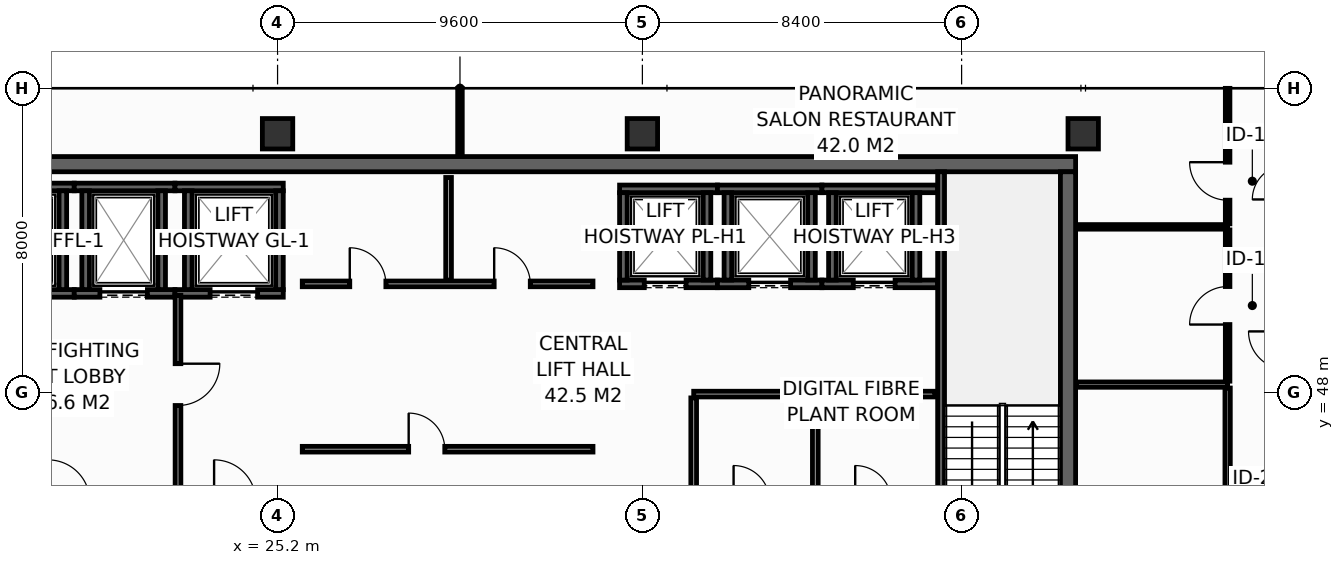
"""IFC4 building model, lengths in metres.
Left out: names, types, materials, properties, quantities, classifications, styles, units other than length and angle.
Written with IfcOpenShell. Run it as: python <this file> out.ifc"""

import sys

from ifc_helpers import new_model, si_unit, direction, frame, frame_2d, origin, origin_2d, place, context, subcontext, project, spatial, rectangle, hollow_rectangle, extrude, element, fill, save


model = new_model("IFC4")
c1 = context("Model", 3, precision=1e-05, world=origin(), true_north=direction((0.0, 1.0)))
c2 = subcontext(c1, "Body", "Model", "MODEL_VIEW")
j1 = project(units=[si_unit("LENGTHUNIT", "METRE"), si_unit("PLANEANGLEUNIT", "RADIAN")], contexts=[c1])
p1 = place(None, origin())
s1 = spatial("IfcSite", under=j1, at=p1, CompositionType="ELEMENT")
p2 = place(p1, origin())
s2 = spatial("IfcBuilding", under=s1, at=p2, CompositionType="ELEMENT")
p3 = place(p2, frame((0.0, 0.0, 257.2)))
s3 = spatial("IfcBuildingStorey", under=s2, at=p3, CompositionType="ELEMENT", Elevation=257.2)
p4 = place(p3, frame((13.7, 54.0, 0.0), z_axis=(0.0, 0.0, 1.0), x_axis=(1.0, 0.0, 0.0)))
e1 = element("IfcWall", 1, at=p4, inside=s3, PredefinedType="SHEAR", context=c2, shape_type="SweptSolid", body=[
    extrude(rectangle(XDim=32.5, YDim=0.4, at=frame_2d((16.25, 0.0))), origin(), (0.0, 0.0, 1.0), 3.55),
])
p5 = place(p3, frame((46.0, 43.4, 0.0), z_axis=(0.0, 0.0, 1.0), x_axis=(0.0, 1.0, 0.0)))
e2 = element("IfcWall", 2, at=p5, inside=s3, PredefinedType="SHEAR", context=c2, shape_type="SweptSolid", body=[
    extrude(rectangle(XDim=10.4, YDim=0.4, at=frame_2d((5.2, 0.0))), origin(), (0.0, 0.0, 1.0), 3.55),
])
for number, where, z_axis, x_axis in (
    (3, (25.2, 54.8, 0.0), (0.0, 0.0, 1.0), (1.0, 0.0, 0.0)),
    (4, (34.8, 54.8, 0.0), (0.0, 0.0, 1.0), (1.0, 0.0, 0.0)),
    (5, (46.4, 54.8, 0.0), (0.0, 0.0, 1.0), (1.0, 0.0, 0.0)),
):
    element("IfcColumn", number, at=place(p3, frame(where, z_axis=z_axis, x_axis=x_axis)), inside=s3, PredefinedType="COLUMN", context=c2, shape_type="SweptSolid", body=[
        extrude(hollow_rectangle(XDim=0.8, YDim=0.8, WallThickness=0.036, at=origin_2d()), origin(), (0.0, 0.0, 1.0), 3.8),
    ])
p6 = place(p3, frame((17.33, 50.6, 0.0), z_axis=(0.0, 0.0, 1.0), x_axis=(1.0, 0.0, 0.0)))
e6 = element("IfcWall", 6, at=p6, inside=s3, PredefinedType="SHEAR", context=c2, shape_type="SweptSolid", body=[
    extrude(rectangle(XDim=2.52, YDim=0.2, at=frame_2d((1.26, 0.0))), origin(), (0.0, 0.0, 1.0), 3.55),
])
p7 = place(p6, frame((0.595, 0.0, 0.0)))
e7 = element("IfcOpeningElement", 7, at=p7, cuts=e6, PredefinedType="OPENING", context=c2, shape_type="SweptSolid", body=[
    extrude(rectangle(XDim=1.25, YDim=2.3, at=frame_2d((0.625, 1.15))), frame((0.0, 0.11, 0.0), z_axis=(0.0, -1.0, 0.0), x_axis=(1.0, 0.0, 0.0)), (0.0, 0.0, 1.0), 0.22),
])
p8 = place(p3, frame((17.33, 53.4, 0.0), z_axis=(0.0, 0.0, 1.0), x_axis=(1.0, 0.0, 0.0)))
e8 = element("IfcWall", 8, at=p8, inside=s3, PredefinedType="SHEAR", context=c2, shape_type="SweptSolid", body=[
    extrude(rectangle(XDim=2.52, YDim=0.2, at=frame_2d((1.26, 0.0))), origin(), (0.0, 0.0, 1.0), 3.55),
])
p9 = place(p3, frame((19.55, 50.7, 0.0), z_axis=(0.0, 0.0, 1.0), x_axis=(0.0, 1.0, 0.0)))
e9 = element("IfcWall", 9, at=p9, inside=s3, PredefinedType="SHEAR", context=c2, shape_type="SweptSolid", body=[
    extrude(rectangle(XDim=2.6, YDim=0.2, at=frame_2d((1.3, 0.0))), origin(), (0.0, 0.0, 1.0), 3.55),
])
p10 = place(p3, frame((19.85, 50.6, 0.0), z_axis=(0.0, 0.0, 1.0), x_axis=(1.0, 0.0, 0.0)))
e10 = element("IfcWall", 10, at=p10, inside=s3, PredefinedType="SHEAR", context=c2, shape_type="SweptSolid", body=[
    extrude(rectangle(XDim=2.65, YDim=0.2, at=frame_2d((1.325, 0.0))), origin(), (0.0, 0.0, 1.0), 3.55),
])
p11 = place(p10, frame((0.675, 0.0, 0.0)))
e11 = element("IfcOpeningElement", 11, at=p11, cuts=e10, PredefinedType="OPENING", context=c2, shape_type="SweptSolid", body=[
    extrude(rectangle(XDim=1.25, YDim=2.3, at=frame_2d((0.625, 1.15))), frame((0.0, 0.11, 0.0), z_axis=(0.0, -1.0, 0.0), x_axis=(1.0, 0.0, 0.0)), (0.0, 0.0, 1.0), 0.22),
])
p12 = place(p3, frame((19.85, 53.4, 0.0), z_axis=(0.0, 0.0, 1.0), x_axis=(1.0, 0.0, 0.0)))
e12 = element("IfcWall", 12, at=p12, inside=s3, PredefinedType="SHEAR", context=c2, shape_type="SweptSolid", body=[
    extrude(rectangle(XDim=2.65, YDim=0.2, at=frame_2d((1.325, 0.0))), origin(), (0.0, 0.0, 1.0), 3.55),
])
for number, where, z_axis, x_axis in (
    (13, (20.15, 50.7, 0.0), (0.0, 0.0, 1.0), (0.0, 1.0, 0.0)),
    (14, (22.15, 50.7, 0.0), (0.0, 0.0, 1.0), (0.0, 1.0, 0.0)),
):
    element("IfcWall", number, at=place(p3, frame(where, z_axis=z_axis, x_axis=x_axis)), inside=s3, PredefinedType="SHEAR", context=c2, shape_type="SweptSolid", body=[
        extrude(rectangle(XDim=2.6, YDim=0.2, at=frame_2d((1.3, 0.0))), origin(), (0.0, 0.0, 1.0), 3.55),
    ])
p13 = place(p3, frame((22.5, 50.6, 0.0), z_axis=(0.0, 0.0, 1.0), x_axis=(1.0, 0.0, 0.0)))
e15 = element("IfcWall", 15, at=p13, inside=s3, PredefinedType="SHEAR", context=c2, shape_type="SweptSolid", body=[
    extrude(rectangle(XDim=2.85, YDim=0.2, at=frame_2d((1.425, 0.0))), origin(), (0.0, 0.0, 1.0), 3.55),
])
p14 = place(p13, frame((0.925, 0.0, 0.0)))
e16 = element("IfcOpeningElement", 16, at=p14, cuts=e15, PredefinedType="OPENING", context=c2, shape_type="SweptSolid", body=[
    extrude(rectangle(XDim=1.25, YDim=2.3, at=frame_2d((0.625, 1.15))), frame((0.0, 0.11, 0.0), z_axis=(0.0, -1.0, 0.0), x_axis=(1.0, 0.0, 0.0)), (0.0, 0.0, 1.0), 0.22),
])
p15 = place(p3, frame((22.5, 53.4, 0.0), z_axis=(0.0, 0.0, 1.0), x_axis=(1.0, 0.0, 0.0)))
e17 = element("IfcWall", 17, at=p15, inside=s3, PredefinedType="SHEAR", context=c2, shape_type="SweptSolid", body=[
    extrude(rectangle(XDim=2.85, YDim=0.2, at=frame_2d((1.425, 0.0))), origin(), (0.0, 0.0, 1.0), 3.55),
])
for number, where, z_axis, x_axis in (
    (18, (22.85, 50.7, 0.0), (0.0, 0.0, 1.0), (0.0, 1.0, 0.0)),
    (19, (25.25, 50.7, 0.0), (0.0, 0.0, 1.0), (0.0, 1.0, 0.0)),
):
    element("IfcWall", number, at=place(p3, frame(where, z_axis=z_axis, x_axis=x_axis)), inside=s3, PredefinedType="SHEAR", context=c2, shape_type="SweptSolid", body=[
        extrude(rectangle(XDim=2.6, YDim=0.2, at=frame_2d((1.3, 0.0))), origin(), (0.0, 0.0, 1.0), 3.55),
    ])
p16 = place(p3, frame((34.2, 50.85, 0.0), z_axis=(0.0, 0.0, 1.0), x_axis=(1.0, 0.0, 0.0)))
e20 = element("IfcWall", 20, at=p16, inside=s3, PredefinedType="SHEAR", context=c2, shape_type="SweptSolid", body=[
    extrude(rectangle(XDim=2.575, YDim=0.2, at=frame_2d((1.288, 0.0))), origin(), (0.0, 0.0, 1.0), 3.55),
])
p17 = place(p16, frame((0.65, 0.0, 0.0)))
e21 = element("IfcOpeningElement", 21, at=p17, cuts=e20, PredefinedType="OPENING", context=c2, shape_type="SweptSolid", body=[
    extrude(rectangle(XDim=1.1, YDim=2.2, at=frame_2d((0.55, 1.1))), frame((0.0, 0.11, 0.0), z_axis=(0.0, -1.0, 0.0), x_axis=(1.0, 0.0, 0.0)), (0.0, 0.0, 1.0), 0.22),
])
p18 = place(p3, frame((34.2, 53.35, 0.0), z_axis=(0.0, 0.0, 1.0), x_axis=(1.0, 0.0, 0.0)))
e22 = element("IfcWall", 22, at=p18, inside=s3, PredefinedType="SHEAR", context=c2, shape_type="SweptSolid", body=[
    extrude(rectangle(XDim=2.575, YDim=0.2, at=frame_2d((1.288, 0.0))), origin(), (0.0, 0.0, 1.0), 3.55),
])
for number, where, z_axis, x_axis in (
    (23, (34.3, 50.95, 0.0), (0.0, 0.0, 1.0), (0.0, 1.0, 0.0)),
    (24, (36.5, 50.95, 0.0), (0.0, 0.0, 1.0), (0.0, 1.0, 0.0)),
):
    element("IfcWall", number, at=place(p3, frame(where, z_axis=z_axis, x_axis=x_axis)), inside=s3, PredefinedType="SHEAR", context=c2, shape_type="SweptSolid", body=[
        extrude(rectangle(XDim=2.3, YDim=0.2, at=frame_2d((1.15, 0.0))), origin(), (0.0, 0.0, 1.0), 3.55),
    ])
p19 = place(p3, frame((36.775, 50.85, 0.0), z_axis=(0.0, 0.0, 1.0), x_axis=(1.0, 0.0, 0.0)))
e25 = element("IfcWall", 25, at=p19, inside=s3, PredefinedType="SHEAR", context=c2, shape_type="SweptSolid", body=[
    extrude(rectangle(XDim=2.75, YDim=0.2, at=frame_2d((1.375, 0.0))), origin(), (0.0, 0.0, 1.0), 3.55),
])
p20 = place(p19, frame((0.825, 0.0, 0.0)))
e26 = element("IfcOpeningElement", 26, at=p20, cuts=e25, PredefinedType="OPENING", context=c2, shape_type="SweptSolid", body=[
    extrude(rectangle(XDim=1.1, YDim=2.2, at=frame_2d((0.55, 1.1))), frame((0.0, 0.11, 0.0), z_axis=(0.0, -1.0, 0.0), x_axis=(1.0, 0.0, 0.0)), (0.0, 0.0, 1.0), 0.22),
])
p21 = place(p3, frame((36.775, 53.35, 0.0), z_axis=(0.0, 0.0, 1.0), x_axis=(1.0, 0.0, 0.0)))
e27 = element("IfcWall", 27, at=p21, inside=s3, PredefinedType="SHEAR", context=c2, shape_type="SweptSolid", body=[
    extrude(rectangle(XDim=2.75, YDim=0.2, at=frame_2d((1.375, 0.0))), origin(), (0.0, 0.0, 1.0), 3.55),
])
for number, where, z_axis, x_axis in (
    (28, (37.05, 50.95, 0.0), (0.0, 0.0, 1.0), (0.0, 1.0, 0.0)),
    (29, (39.25, 50.95, 0.0), (0.0, 0.0, 1.0), (0.0, 1.0, 0.0)),
):
    element("IfcWall", number, at=place(p3, frame(where, z_axis=z_axis, x_axis=x_axis)), inside=s3, PredefinedType="SHEAR", context=c2, shape_type="SweptSolid", body=[
        extrude(rectangle(XDim=2.3, YDim=0.2, at=frame_2d((1.15, 0.0))), origin(), (0.0, 0.0, 1.0), 3.55),
    ])
p22 = place(p3, frame((39.525, 50.85, 0.0), z_axis=(0.0, 0.0, 1.0), x_axis=(1.0, 0.0, 0.0)))
e30 = element("IfcWall", 30, at=p22, inside=s3, PredefinedType="SHEAR", context=c2, shape_type="SweptSolid", body=[
    extrude(rectangle(XDim=3.045, YDim=0.2, at=frame_2d((1.522, 0.0))), origin(), (0.0, 0.0, 1.0), 3.55),
])
p23 = place(p22, frame((0.825, 0.0, 0.0)))
e31 = element("IfcOpeningElement", 31, at=p23, cuts=e30, PredefinedType="OPENING", context=c2, shape_type="SweptSolid", body=[
    extrude(rectangle(XDim=1.1, YDim=2.2, at=frame_2d((0.55, 1.1))), frame((0.0, 0.11, 0.0), z_axis=(0.0, -1.0, 0.0), x_axis=(1.0, 0.0, 0.0)), (0.0, 0.0, 1.0), 0.22),
])
p24 = place(p3, frame((39.525, 53.35, 0.0), z_axis=(0.0, 0.0, 1.0), x_axis=(1.0, 0.0, 0.0)))
e32 = element("IfcWall", 32, at=p24, inside=s3, PredefinedType="SHEAR", context=c2, shape_type="SweptSolid", body=[
    extrude(rectangle(XDim=3.045, YDim=0.2, at=frame_2d((1.522, 0.0))), origin(), (0.0, 0.0, 1.0), 3.55),
])
for number, where, z_axis, x_axis in (
    (33, (39.8, 50.95, 0.0), (0.0, 0.0, 1.0), (0.0, 1.0, 0.0)),
    (34, (42.0, 50.95, 0.0), (0.0, 0.0, 1.0), (0.0, 1.0, 0.0)),
):
    element("IfcWall", number, at=place(p3, frame(where, z_axis=z_axis, x_axis=x_axis)), inside=s3, PredefinedType="SHEAR", context=c2, shape_type="SweptSolid", body=[
        extrude(rectangle(XDim=2.3, YDim=0.2, at=frame_2d((1.15, 0.0))), origin(), (0.0, 0.0, 1.0), 3.55),
    ])
p25 = place(p3, frame((42.66, 53.8, 0.0), z_axis=(0.0, 0.0, 1.0), x_axis=(0.0, -1.0, 0.0)))
e35 = element("IfcWall", 35, at=p25, inside=s3, PredefinedType="SHEAR", context=c2, shape_type="SweptSolid", body=[
    extrude(rectangle(XDim=10.4, YDim=0.18, at=frame_2d((5.2, 0.0))), origin(), (0.0, 0.0, 1.0), 3.55),
])
p26 = place(p25, frame((8.99, 0.0, 0.0)))
e36 = element("IfcOpeningElement", 36, at=p26, cuts=e35, PredefinedType="OPENING", context=c2, shape_type="SweptSolid", body=[
    extrude(rectangle(XDim=1.1, YDim=2.15, at=frame_2d((0.55, 1.075))), frame((0.0, 0.1, 0.0), z_axis=(0.0, -1.0, 0.0), x_axis=(1.0, 0.0, 0.0)), (0.0, 0.0, 1.0), 0.2),
])
p27 = place(p3, frame((22.58, 50.55, 0.0), z_axis=(0.0, 0.0, 1.0), x_axis=(0.0, -1.0, 0.0)))
e37 = element("IfcWall", 37, at=p27, inside=s3, PredefinedType="PARTITIONING", context=c2, shape_type="SweptSolid", body=[
    extrude(rectangle(XDim=5.33, YDim=0.15, at=frame_2d((2.665, 0.0))), origin(), (0.0, 0.0, 1.0), 3.55),
])
p28 = place(p27, frame((1.8, 0.0, 0.0)))
e38 = element("IfcOpeningElement", 38, at=p28, cuts=e37, PredefinedType="OPENING", context=c2, shape_type="SweptSolid", body=[
    extrude(rectangle(XDim=1.1, YDim=2.15, at=frame_2d((0.55, 1.075))), frame((0.0, 0.085, 0.0), z_axis=(0.0, -1.0, 0.0), x_axis=(1.0, 0.0, 0.0)), (0.0, 0.0, 1.0), 0.17),
])
p29 = place(p3, frame((36.15, 47.95, 0.0), z_axis=(0.0, 0.0, 1.0), x_axis=(1.0, 0.0, 0.0)))
e39 = element("IfcWall", 39, at=p29, inside=s3, PredefinedType="PARTITIONING", context=c2, shape_type="SweptSolid", body=[
    extrude(rectangle(XDim=6.35, YDim=0.15, at=frame_2d((3.175, 0.0))), origin(), (0.0, 0.0, 1.0), 3.55),
])
for number, where, z_axis, x_axis in (
    (40, (36.15, 45.22, 0.0), (0.0, 0.0, 1.0), (0.0, 1.0, 0.0)),
    (41, (39.35, 45.22, 0.0), (0.0, 0.0, 1.0), (0.0, 1.0, 0.0)),
):
    element("IfcWall", number, at=place(p3, frame(where, z_axis=z_axis, x_axis=x_axis)), inside=s3, PredefinedType="PARTITIONING", context=c2, shape_type="SweptSolid", body=[
        extrude(rectangle(XDim=2.63, YDim=0.15, at=frame_2d((1.315, 0.0))), origin(), (0.0, 0.0, 1.0), 3.55),
    ])
p30 = place(p3, frame((25.85, 50.85, 0.0), z_axis=(0.0, 0.0, 1.0), x_axis=(1.0, 0.0, 0.0)))
e42 = element("IfcWall", 42, at=p30, inside=s3, PredefinedType="PARTITIONING", context=c2, shape_type="SweptSolid", body=[
    extrude(rectangle(XDim=7.65, YDim=0.15, at=frame_2d((3.825, 0.0))), origin(), (0.0, 0.0, 1.0), 3.55),
])
p31 = place(p30, frame((1.25, 0.0, 0.0)))
e43 = element("IfcOpeningElement", 43, at=p31, cuts=e42, PredefinedType="OPENING", context=c2, shape_type="SweptSolid", body=[
    extrude(rectangle(XDim=0.95, YDim=2.15, at=frame_2d((0.475, 1.075))), frame((0.0, 0.085, 0.0), z_axis=(0.0, -1.0, 0.0), x_axis=(1.0, 0.0, 0.0)), (0.0, 0.0, 1.0), 0.17),
])
p32 = place(p30, frame((5.05, 0.0, 0.0)))
e44 = element("IfcOpeningElement", 44, at=p32, cuts=e42, PredefinedType="OPENING", context=c2, shape_type="SweptSolid", body=[
    extrude(rectangle(XDim=0.95, YDim=2.15, at=frame_2d((0.475, 1.075))), frame((0.0, 0.085, 0.0), z_axis=(0.0, -1.0, 0.0), x_axis=(1.0, 0.0, 0.0)), (0.0, 0.0, 1.0), 0.17),
])
p33 = place(p3, frame((29.7, 50.95, 0.0), z_axis=(0.0, 0.0, 1.0), x_axis=(0.0, 1.0, 0.0)))
e45 = element("IfcWall", 45, at=p33, inside=s3, PredefinedType="PARTITIONING", context=c2, shape_type="SweptSolid", body=[
    extrude(rectangle(XDim=2.7, YDim=0.15, at=frame_2d((1.35, 0.0))), origin(), (0.0, 0.0, 1.0), 3.55),
])
p34 = place(p3, frame((25.85, 46.5, 0.0), z_axis=(0.0, 0.0, 1.0), x_axis=(1.0, 0.0, 0.0)))
e46 = element("IfcWall", 46, at=p34, inside=s3, PredefinedType="PARTITIONING", context=c2, shape_type="SweptSolid", body=[
    extrude(rectangle(XDim=7.65, YDim=0.15, at=frame_2d((3.825, 0.0))), origin(), (0.0, 0.0, 1.0), 3.55),
])
p35 = place(p34, frame((2.8, 0.0, 0.0)))
e47 = element("IfcOpeningElement", 47, at=p35, cuts=e46, PredefinedType="OPENING", context=c2, shape_type="SweptSolid", body=[
    extrude(rectangle(XDim=0.95, YDim=2.15, at=frame_2d((0.475, 1.075))), frame((0.0, 0.085, 0.0), z_axis=(0.0, -1.0, 0.0), x_axis=(1.0, 0.0, 0.0)), (0.0, 0.0, 1.0), 0.17),
])
p36 = place(p3, frame((46.22, 48.2, 0.0), z_axis=(0.0, 0.0, 1.0), x_axis=(1.0, 0.0, 0.0)))
e48 = element("IfcWall", 48, at=p36, inside=s3, PredefinedType="PARTITIONING", context=c2, shape_type="SweptSolid", body=[
    extrude(rectangle(XDim=3.98, YDim=0.14, at=frame_2d((1.99, 0.0))), origin(), (0.0, 0.0, 1.0), 3.55),
])
p37 = place(p3, frame((50.2, 40.94, 0.0), z_axis=(0.0, 0.0, 1.0), x_axis=(0.0, 1.0, 0.0)))
e49 = element("IfcWall", 49, at=p37, inside=s3, PredefinedType="PARTITIONING", context=c2, shape_type="SweptSolid", body=[
    extrude(rectangle(XDim=7.17, YDim=0.14, at=frame_2d((3.585, 0.0))), origin(), (0.0, 0.0, 1.0), 2.947),
])
p38 = place(p37, frame((3.135, 0.0, 0.0)))
e50 = element("IfcOpeningElement", 50, at=p38, cuts=e49, PredefinedType="OPENING", context=c2, shape_type="SweptSolid", body=[
    extrude(rectangle(XDim=0.9, YDim=2.1, at=frame_2d((0.45, 1.05))), frame((0.0, 0.08, 0.0), z_axis=(0.0, -1.0, 0.0), x_axis=(1.0, 0.0, 0.0)), (0.0, 0.0, 1.0), 0.16),
])
p39 = place(p3, frame((46.22, 52.35, 0.0), z_axis=(0.0, 0.0, 1.0), x_axis=(1.0, 0.0, 0.0)))
e51 = element("IfcWall", 51, at=p39, inside=s3, PredefinedType="PARTITIONING", context=c2, shape_type="SweptSolid", body=[
    extrude(rectangle(XDim=3.98, YDim=0.12, at=frame_2d((1.99, 0.0))), origin(), (0.0, 0.0, 1.0), 3.55),
])
p40 = place(p3, frame((30.0, 54.22, 0.0), z_axis=(0.0, 0.0, 1.0), x_axis=(0.0, 1.0, 0.0)))
e52 = element("IfcWall", 52, at=p40, inside=s3, PredefinedType="PARTITIONING", context=c2, shape_type="SweptSolid", body=[
    extrude(rectangle(XDim=1.775, YDim=0.12, at=frame_2d((0.888, 0.0))), origin(), (0.0, 0.0, 1.0), 2.935),
])
p41 = place(p3, frame((50.2, 48.29, 0.0), z_axis=(0.0, 0.0, 1.0), x_axis=(0.0, 1.0, 0.0)))
e53 = element("IfcWall", 53, at=p41, inside=s3, PredefinedType="PARTITIONING", context=c2, shape_type="SweptSolid", body=[
    extrude(rectangle(XDim=3.98, YDim=0.12, at=frame_2d((1.99, 0.0))), origin(), (0.0, 0.0, 1.0), 3.55),
])
p42 = place(p41, frame((1.49, 0.0, 0.0)))
e54 = element("IfcOpeningElement", 54, at=p42, cuts=e53, PredefinedType="OPENING", context=c2, shape_type="SweptSolid", body=[
    extrude(rectangle(XDim=1.0, YDim=2.15, at=frame_2d((0.5, 1.075))), frame((0.0, 0.07, 0.0), z_axis=(0.0, -1.0, 0.0), x_axis=(1.0, 0.0, 0.0)), (0.0, 0.0, 1.0), 0.14),
])
p43 = place(p3, frame((50.2, 52.43, 0.0), z_axis=(0.0, 0.0, 1.0), x_axis=(0.0, 1.0, 0.0)))
e55 = element("IfcWall", 55, at=p43, inside=s3, PredefinedType="PARTITIONING", context=c2, shape_type="SweptSolid", body=[
    extrude(rectangle(XDim=3.565, YDim=0.12, at=frame_2d((1.783, 0.0))), origin(), (0.0, 0.0, 1.0), 2.935),
])
p44 = place(p43, frame((0.622, 0.0, 0.0)))
e56 = element("IfcOpeningElement", 56, at=p44, cuts=e55, PredefinedType="OPENING", context=c2, shape_type="SweptSolid", body=[
    extrude(rectangle(XDim=1.0, YDim=2.15, at=frame_2d((0.5, 1.075))), frame((0.0, 0.07, 0.0), z_axis=(0.0, -1.0, 0.0), x_axis=(1.0, 0.0, 0.0)), (0.0, 0.0, 1.0), 0.14),
])
p45 = place(p11, origin())
e57 = element("IfcDoor", 57, at=p45, inside=s3, OperationType="SLIDING_TO_LEFT", PredefinedType="DOOR", context=c2, shape_type="SweptSolid", body=[
    extrude(rectangle(XDim=1.25, YDim=2.3, at=frame_2d((0.625, 1.15))), frame((0.0, 0.025, 0.0), z_axis=(0.0, -1.0, 0.0), x_axis=(1.0, 0.0, 0.0)), (0.0, 0.0, 1.0), 0.05),
])
fill(e11, e57)
p46 = place(p14, origin())
e58 = element("IfcDoor", 58, at=p46, inside=s3, OperationType="SLIDING_TO_LEFT", PredefinedType="DOOR", context=c2, shape_type="SweptSolid", body=[
    extrude(rectangle(XDim=1.25, YDim=2.3, at=frame_2d((0.625, 1.15))), frame((0.0, 0.025, 0.0), z_axis=(0.0, -1.0, 0.0), x_axis=(1.0, 0.0, 0.0)), (0.0, 0.0, 1.0), 0.05),
])
fill(e16, e58)
p47 = place(p17, origin())
e59 = element("IfcDoor", 59, at=p47, inside=s3, OperationType="SLIDING_TO_LEFT", PredefinedType="DOOR", context=c2, shape_type="SweptSolid", body=[
    extrude(rectangle(XDim=1.1, YDim=2.2, at=frame_2d((0.55, 1.1))), frame((0.0, 0.025, 0.0), z_axis=(0.0, -1.0, 0.0), x_axis=(1.0, 0.0, 0.0)), (0.0, 0.0, 1.0), 0.05),
])
fill(e21, e59)
p48 = place(p20, origin())
e60 = element("IfcDoor", 60, at=p48, inside=s3, OperationType="SLIDING_TO_LEFT", PredefinedType="DOOR", context=c2, shape_type="SweptSolid", body=[
    extrude(rectangle(XDim=1.1, YDim=2.2, at=frame_2d((0.55, 1.1))), frame((0.0, 0.025, 0.0), z_axis=(0.0, -1.0, 0.0), x_axis=(1.0, 0.0, 0.0)), (0.0, 0.0, 1.0), 0.05),
])
fill(e26, e60)
p49 = place(p23, origin())
e61 = element("IfcDoor", 61, at=p49, inside=s3, OperationType="SLIDING_TO_LEFT", PredefinedType="DOOR", context=c2, shape_type="SweptSolid", body=[
    extrude(rectangle(XDim=1.1, YDim=2.2, at=frame_2d((0.55, 1.1))), frame((0.0, 0.025, 0.0), z_axis=(0.0, -1.0, 0.0), x_axis=(1.0, 0.0, 0.0)), (0.0, 0.0, 1.0), 0.05),
])
fill(e31, e61)
p50 = place(p28, origin())
e62 = element("IfcDoor", 62, at=p50, inside=s3, OperationType="SINGLE_SWING_LEFT", PredefinedType="DOOR", context=c2, shape_type="SweptSolid", body=[
    extrude(rectangle(XDim=1.1, YDim=2.15, at=frame_2d((0.55, 1.075))), frame((0.0, 0.025, 0.0), z_axis=(0.0, -1.0, 0.0), x_axis=(1.0, 0.0, 0.0)), (0.0, 0.0, 1.0), 0.05),
])
fill(e38, e62)
p51 = place(p31, origin())
e63 = element("IfcDoor", 63, at=p51, inside=s3, OperationType="SINGLE_SWING_LEFT", PredefinedType="DOOR", context=c2, shape_type="SweptSolid", body=[
    extrude(rectangle(XDim=0.95, YDim=2.15, at=frame_2d((0.475, 1.075))), frame((0.0, 0.025, 0.0), z_axis=(0.0, -1.0, 0.0), x_axis=(1.0, 0.0, 0.0)), (0.0, 0.0, 1.0), 0.05),
])
fill(e43, e63)
p52 = place(p32, origin())
e64 = element("IfcDoor", 64, at=p52, inside=s3, OperationType="SINGLE_SWING_LEFT", PredefinedType="DOOR", context=c2, shape_type="SweptSolid", body=[
    extrude(rectangle(XDim=0.95, YDim=2.15, at=frame_2d((0.475, 1.075))), frame((0.0, 0.025, 0.0), z_axis=(0.0, -1.0, 0.0), x_axis=(1.0, 0.0, 0.0)), (0.0, 0.0, 1.0), 0.05),
])
fill(e44, e64)
p53 = place(p35, origin())
e65 = element("IfcDoor", 65, at=p53, inside=s3, OperationType="SINGLE_SWING_LEFT", PredefinedType="DOOR", context=c2, shape_type="SweptSolid", body=[
    extrude(rectangle(XDim=0.95, YDim=2.15, at=frame_2d((0.475, 1.075))), frame((0.0, 0.025, 0.0), z_axis=(0.0, -1.0, 0.0), x_axis=(1.0, 0.0, 0.0)), (0.0, 0.0, 1.0), 0.05),
])
fill(e47, e65)
p54 = place(p42, origin())
e66 = element("IfcDoor", 66, at=p54, inside=s3, OperationType="SINGLE_SWING_LEFT", PredefinedType="DOOR", context=c2, shape_type="SweptSolid", body=[
    extrude(rectangle(XDim=1.0, YDim=2.15, at=frame_2d((0.5, 1.075))), frame((0.0, 0.025, 0.0), z_axis=(0.0, -1.0, 0.0), x_axis=(1.0, 0.0, 0.0)), (0.0, 0.0, 1.0), 0.05),
])
fill(e54, e66)
p55 = place(p44, origin())
e67 = element("IfcDoor", 67, at=p55, inside=s3, OperationType="SINGLE_SWING_RIGHT", PredefinedType="DOOR", context=c2, shape_type="SweptSolid", body=[
    extrude(rectangle(XDim=1.0, YDim=2.15, at=frame_2d((0.5, 1.075))), frame((0.0, 0.025, 0.0), z_axis=(0.0, -1.0, 0.0), x_axis=(1.0, 0.0, 0.0)), (0.0, 0.0, 1.0), 0.05),
])
fill(e56, e67)
save(model, sys.argv[1])
